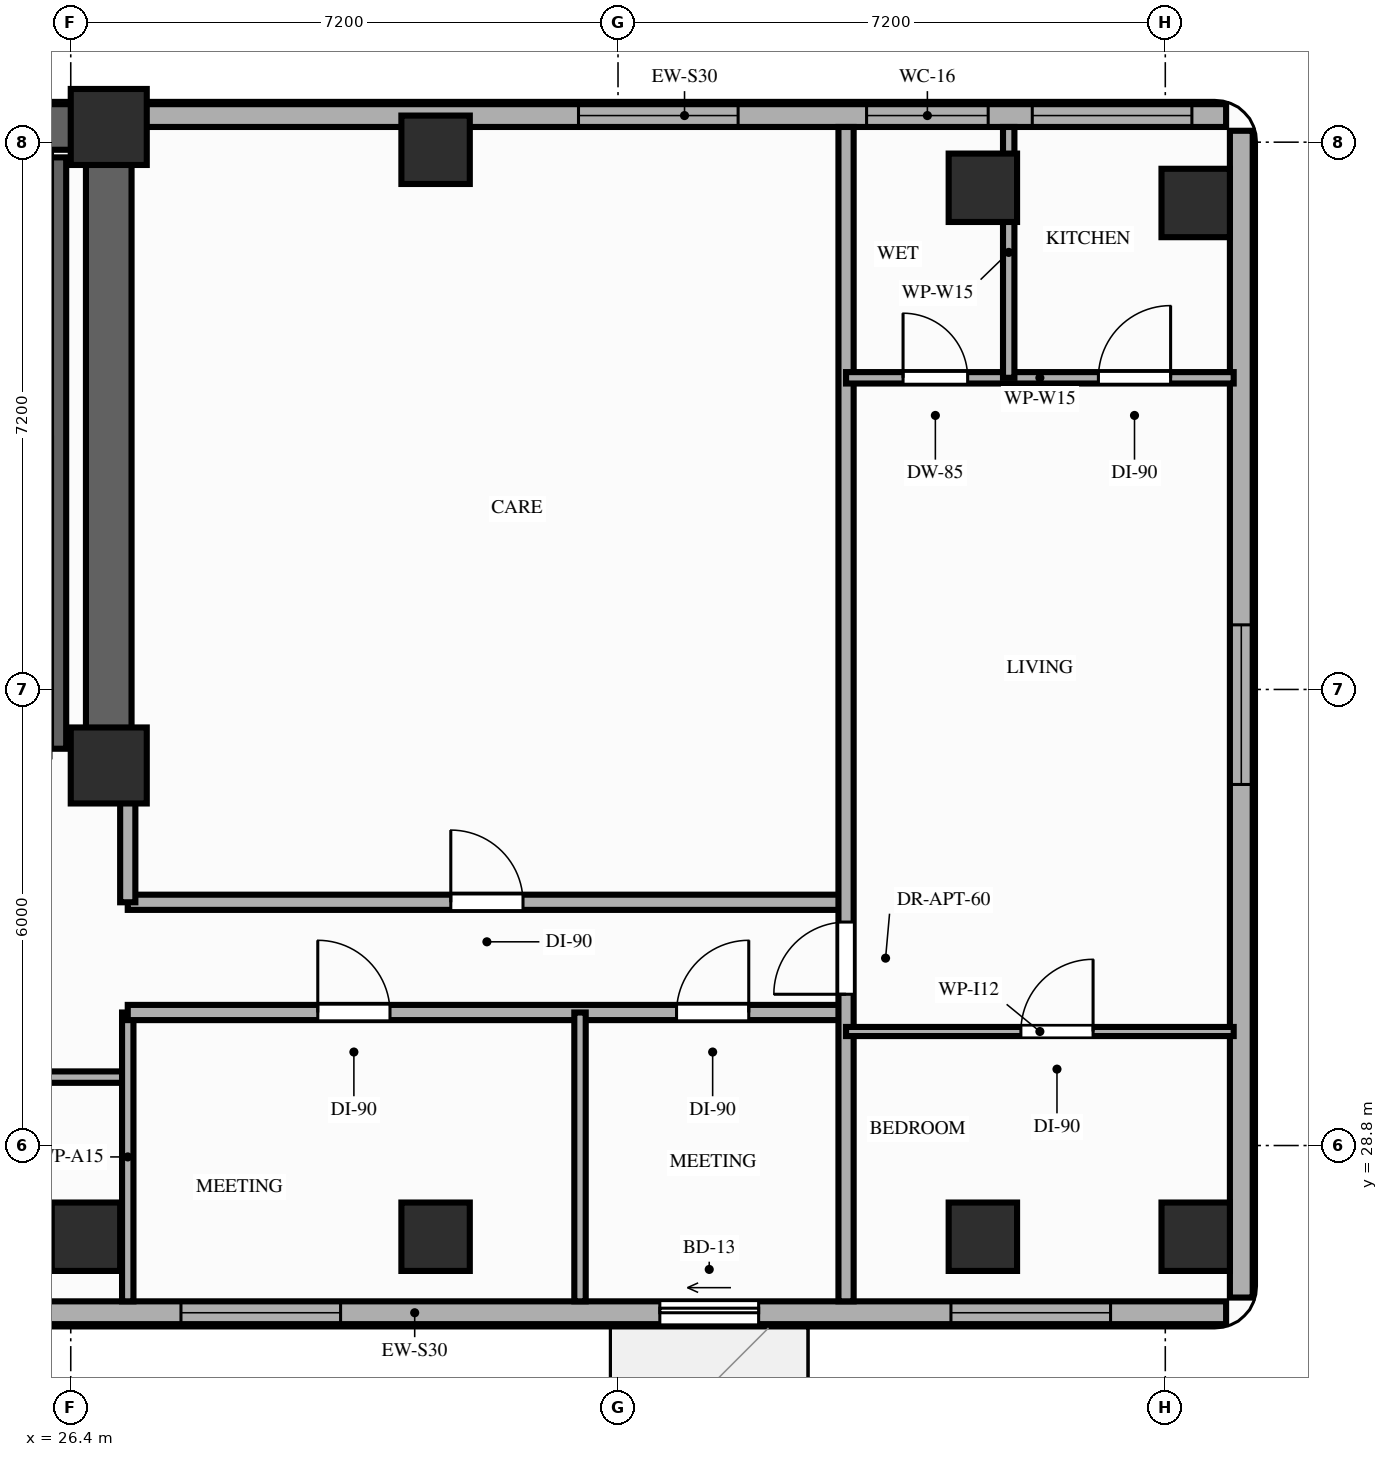
"""IFC4 building model, lengths in metres.
Left out: names, types, materials, properties, quantities, classifications, styles, units other than length and angle.
Written with IfcOpenShell. Run it as: python <this file> out.ifc"""

import sys

from ifc_helpers import new_model, si_unit, direction, frame, frame_2d, origin, origin_2d, place, context, subcontext, project, spatial, rectangle, extrude, element, fill, save


model = new_model("IFC4")
c1 = context("Model", 3, precision=1e-05, world=origin(), true_north=direction((0.0, 1.0)))
c2 = subcontext(c1, "Body", "Model", "MODEL_VIEW")
j1 = project(units=[si_unit("LENGTHUNIT", "METRE"), si_unit("PLANEANGLEUNIT", "RADIAN")], contexts=[c1])
p1 = place(None, origin())
s1 = spatial("IfcSite", under=j1, at=p1, CompositionType="ELEMENT")
p2 = place(p1, origin())
s2 = spatial("IfcBuilding", under=s1, at=p2, CompositionType="ELEMENT")
p3 = place(p2, frame((0.0, 0.0, 169.6)))
s3 = spatial("IfcBuildingStorey", under=s2, at=p3, CompositionType="ELEMENT", Elevation=169.6)
for number, where, z_axis, x_axis in (
    (1, (26.9, 33.8, 0.0), (0.0, 0.0, 1.0), (1.0, 0.0, 0.0)),
    (2, (26.9, 42.2, 0.0), (0.0, 0.0, 1.0), (1.0, 0.0, 0.0)),
):
    element("IfcColumn", number, at=place(p3, frame(where, z_axis=z_axis, x_axis=x_axis)), inside=s3, PredefinedType="COLUMN", context=c2, shape_type="SweptSolid", body=[
        extrude(rectangle(XDim=1.0, YDim=1.0, at=origin_2d()), origin(), (0.0, 0.0, 1.0), 3.2),
    ])
for number, where, z_axis, x_axis in (
    (3, (26.6, 27.6, 0.0), (0.0, 0.0, 1.0), (1.0, 0.0, 0.0)),
    (4, (31.2, 27.6, 0.0), (0.0, 0.0, 1.0), (1.0, 0.0, 0.0)),
    (5, (31.2, 41.9, 0.0), (0.0, 0.0, 1.0), (1.0, 0.0, 0.0)),
    (6, (38.4, 27.6, 0.0), (0.0, 0.0, 1.0), (1.0, 0.0, 0.0)),
    (7, (38.4, 41.4, 0.0), (0.0, 0.0, 1.0), (1.0, 0.0, 0.0)),
    (8, (41.2, 27.6, 0.0), (0.0, 0.0, 1.0), (1.0, 0.0, 0.0)),
    (9, (41.2, 41.2, 0.0), (0.0, 0.0, 1.0), (1.0, 0.0, 0.0)),
):
    element("IfcColumn", number, at=place(p3, frame(where, z_axis=z_axis, x_axis=x_axis)), inside=s3, PredefinedType="COLUMN", context=c2, shape_type="SweptSolid", body=[
        extrude(rectangle(XDim=0.9, YDim=0.9, at=origin_2d()), origin(), (0.0, 0.0, 1.0), 3.2),
    ])
p4 = place(p3, frame((41.6, 42.35, 0.0), z_axis=(0.0, 0.0, 1.0), x_axis=(-1.0, 0.0, 0.0)))
e10 = element("IfcWall", 10, at=p4, inside=s3, PredefinedType="STANDARD", context=c2, shape_type="SweptSolid", body=[
    extrude(rectangle(XDim=14.25, YDim=0.3, at=frame_2d((7.125, 0.0))), origin(), (0.0, 0.0, 1.0), 2.45),
])
p5 = place(p4, frame((3.13, 0.0, 0.85)))
e11 = element("IfcOpeningElement", 11, at=p5, cuts=e10, PredefinedType="OPENING", context=c2, shape_type="SweptSolid", body=[
    extrude(rectangle(XDim=1.6, YDim=1.35, at=frame_2d((0.8, 0.675))), frame((0.0, 0.16, 0.0), z_axis=(0.0, -1.0, 0.0), x_axis=(1.0, 0.0, 0.0)), (0.0, 0.0, 1.0), 0.32),
])
p6 = place(p4, frame((0.45, 0.0, 0.85)))
e12 = element("IfcOpeningElement", 12, at=p6, cuts=e10, PredefinedType="OPENING", context=c2, shape_type="SweptSolid", body=[
    extrude(rectangle(XDim=2.1, YDim=1.35, at=frame_2d((1.05, 0.675))), frame((0.0, 0.16, 0.0), z_axis=(0.0, -1.0, 0.0), x_axis=(1.0, 0.0, 0.0)), (0.0, 0.0, 1.0), 0.32),
])
p7 = place(p4, frame((6.42, 0.0, 0.85)))
e13 = element("IfcOpeningElement", 13, at=p7, cuts=e10, PredefinedType="OPENING", context=c2, shape_type="SweptSolid", body=[
    extrude(rectangle(XDim=2.1, YDim=1.35, at=frame_2d((1.05, 0.675))), frame((0.0, 0.16, 0.0), z_axis=(0.0, -1.0, 0.0), x_axis=(1.0, 0.0, 0.0)), (0.0, 0.0, 1.0), 0.32),
])
p8 = place(p3, frame((20.25, 26.6, 0.0), z_axis=(0.0, 0.0, 1.0), x_axis=(1.0, 0.0, 0.0)))
e14 = element("IfcWall", 14, at=p8, inside=s3, PredefinedType="STANDARD", context=c2, shape_type="SweptSolid", body=[
    extrude(rectangle(XDim=21.35, YDim=0.3, at=frame_2d((10.675, 0.0))), origin(), (0.0, 0.0, 1.0), 2.71),
])
p9 = place(p8, frame((13.9, 0.0, 0.0)))
e15 = element("IfcOpeningElement", 15, at=p9, cuts=e14, PredefinedType="OPENING", context=c2, shape_type="SweptSolid", body=[
    extrude(rectangle(XDim=1.3, YDim=2.08, at=frame_2d((0.65, 1.04))), frame((0.0, 0.16, 0.0), z_axis=(0.0, -1.0, 0.0), x_axis=(1.0, 0.0, 0.0)), (0.0, 0.0, 1.0), 0.32),
])
p10 = place(p8, frame((17.73, 0.0, 0.85)))
e16 = element("IfcOpeningElement", 16, at=p10, cuts=e14, PredefinedType="OPENING", context=c2, shape_type="SweptSolid", body=[
    extrude(rectangle(XDim=2.1, YDim=1.61, at=frame_2d((1.05, 0.805))), frame((0.0, 0.16, 0.0), z_axis=(0.0, -1.0, 0.0), x_axis=(1.0, 0.0, 0.0)), (0.0, 0.0, 1.0), 0.32),
])
p11 = place(p8, frame((2.1, 0.0, 0.85)))
e17 = element("IfcOpeningElement", 17, at=p11, cuts=e14, PredefinedType="OPENING", context=c2, shape_type="SweptSolid", body=[
    extrude(rectangle(XDim=2.1, YDim=1.61, at=frame_2d((1.05, 0.805))), frame((0.0, 0.16, 0.0), z_axis=(0.0, -1.0, 0.0), x_axis=(1.0, 0.0, 0.0)), (0.0, 0.0, 1.0), 0.32),
])
p12 = place(p8, frame((7.6, 0.0, 0.85)))
e18 = element("IfcOpeningElement", 18, at=p12, cuts=e14, PredefinedType="OPENING", context=c2, shape_type="SweptSolid", body=[
    extrude(rectangle(XDim=2.1, YDim=1.61, at=frame_2d((1.05, 0.805))), frame((0.0, 0.16, 0.0), z_axis=(0.0, -1.0, 0.0), x_axis=(1.0, 0.0, 0.0)), (0.0, 0.0, 1.0), 0.32),
])
p13 = place(p3, frame((41.8, 26.8, 0.0), z_axis=(0.0, 0.0, 1.0), x_axis=(0.0, 1.0, 0.0)))
e19 = element("IfcWall", 19, at=p13, inside=s3, PredefinedType="STANDARD", context=c2, shape_type="SweptSolid", body=[
    extrude(rectangle(XDim=15.35, YDim=0.3, at=frame_2d((7.675, 0.0))), origin(), (0.0, 0.0, 1.0), 3.02),
])
p14 = place(p13, frame((6.75, 0.0, 0.85)))
e20 = element("IfcOpeningElement", 20, at=p14, cuts=e19, PredefinedType="OPENING", context=c2, shape_type="SweptSolid", body=[
    extrude(rectangle(XDim=2.1, YDim=1.8, at=frame_2d((1.05, 0.9))), frame((0.0, 0.16, 0.0), z_axis=(0.0, -1.0, 0.0), x_axis=(1.0, 0.0, 0.0)), (0.0, 0.0, 1.0), 0.32),
])
p15 = place(p3, frame((6.45, 42.2, 0.0), z_axis=(0.0, 0.0, 1.0), x_axis=(1.0, 0.0, 0.0)))
e21 = element("IfcWall", 21, at=p15, inside=s3, PredefinedType="SHEAR", context=c2, shape_type="SweptSolid", body=[
    extrude(rectangle(XDim=20.45, YDim=0.6, at=frame_2d((10.225, 0.0))), origin(), (0.0, 0.0, 1.0), 3.02),
])
p16 = place(p3, frame((26.9, 33.8, 0.0), z_axis=(0.0, 0.0, 1.0), x_axis=(0.0, 1.0, 0.0)))
e22 = element("IfcWall", 22, at=p16, inside=s3, PredefinedType="SHEAR", context=c2, shape_type="SweptSolid", body=[
    extrude(rectangle(XDim=7.95, YDim=0.6, at=frame_2d((3.975, 0.0))), origin(), (0.0, 0.0, 1.0), 3.02),
])
p17 = place(p3, frame((26.24, 34.02, 0.0), z_axis=(0.0, 0.0, 1.0), x_axis=(0.0, 1.0, 0.0)))
e23 = element("IfcWall", 23, at=p17, inside=s3, PredefinedType="SHEAR", context=c2, shape_type="SweptSolid", body=[
    extrude(rectangle(XDim=7.78, YDim=0.2, at=frame_2d((3.89, 0.0))), origin(), (0.0, 0.0, 1.0), 3.02),
])
p18 = place(p3, frame((20.45, 29.7, 0.0), z_axis=(0.0, 0.0, 1.0), x_axis=(1.0, 0.0, 0.0)))
e24 = element("IfcWall", 24, at=p18, inside=s3, PredefinedType="PARTITIONING", context=c2, shape_type="SweptSolid", body=[
    extrude(rectangle(XDim=6.7, YDim=0.15, at=frame_2d((3.35, 0.0))), origin(), (0.0, 0.0, 1.0), 3.02),
])
p19 = place(p18, frame((2.8, 0.0, 0.0)))
e25 = element("IfcOpeningElement", 25, at=p19, cuts=e24, PredefinedType="OPENING", context=c2, shape_type="SweptSolid", body=[
    extrude(rectangle(XDim=0.95, YDim=2.15, at=frame_2d((0.475, 1.075))), frame((0.0, 0.085, 0.0), z_axis=(0.0, -1.0, 0.0), x_axis=(1.0, 0.0, 0.0)), (0.0, 0.0, 1.0), 0.17),
])
p20 = place(p3, frame((27.15, 26.75, 0.0), z_axis=(0.0, 0.0, 1.0), x_axis=(0.0, 1.0, 0.0)))
e26 = element("IfcWall", 26, at=p20, inside=s3, PredefinedType="PARTITIONING", context=c2, shape_type="SweptSolid", body=[
    extrude(rectangle(XDim=3.8, YDim=0.15, at=frame_2d((1.9, 0.0))), origin(), (0.0, 0.0, 1.0), 2.45),
])
p21 = place(p3, frame((27.15, 30.55, 0.0), z_axis=(0.0, 0.0, 1.0), x_axis=(1.0, 0.0, 0.0)))
e27 = element("IfcWall", 27, at=p21, inside=s3, PredefinedType="PARTITIONING", context=c2, shape_type="SweptSolid", body=[
    extrude(rectangle(XDim=9.45, YDim=0.2, at=frame_2d((4.725, 0.0))), origin(), (0.0, 0.0, 1.0), 2.45),
])
p22 = place(p21, frame((2.5, 0.0, 0.0)))
e28 = element("IfcOpeningElement", 28, at=p22, cuts=e27, PredefinedType="OPENING", context=c2, shape_type="SweptSolid", body=[
    extrude(rectangle(XDim=0.95, YDim=2.15, at=frame_2d((0.475, 1.075))), frame((0.0, 0.11, 0.0), z_axis=(0.0, -1.0, 0.0), x_axis=(1.0, 0.0, 0.0)), (0.0, 0.0, 1.0), 0.22),
])
p23 = place(p21, frame((7.22, 0.0, 0.0)))
e29 = element("IfcOpeningElement", 29, at=p23, cuts=e27, PredefinedType="OPENING", context=c2, shape_type="SweptSolid", body=[
    extrude(rectangle(XDim=0.95, YDim=2.15, at=frame_2d((0.475, 1.075))), frame((0.0, 0.11, 0.0), z_axis=(0.0, -1.0, 0.0), x_axis=(1.0, 0.0, 0.0)), (0.0, 0.0, 1.0), 0.22),
])
p24 = place(p3, frame((27.15, 32.0, 0.0), z_axis=(0.0, 0.0, 1.0), x_axis=(1.0, 0.0, 0.0)))
e30 = element("IfcWall", 30, at=p24, inside=s3, PredefinedType="PARTITIONING", context=c2, shape_type="SweptSolid", body=[
    extrude(rectangle(XDim=9.45, YDim=0.2, at=frame_2d((4.725, 0.0))), origin(), (0.0, 0.0, 1.0), 2.45),
])
p25 = place(p24, frame((4.25, 0.0, 0.0)))
e31 = element("IfcOpeningElement", 31, at=p25, cuts=e30, PredefinedType="OPENING", context=c2, shape_type="SweptSolid", body=[
    extrude(rectangle(XDim=0.95, YDim=2.15, at=frame_2d((0.475, 1.075))), frame((0.0, 0.11, 0.0), z_axis=(0.0, -1.0, 0.0), x_axis=(1.0, 0.0, 0.0)), (0.0, 0.0, 1.0), 0.22),
])
p26 = place(p3, frame((27.15, 32.0, 0.0), z_axis=(0.0, 0.0, 1.0), x_axis=(0.0, 1.0, 0.0)))
e32 = element("IfcWall", 32, at=p26, inside=s3, PredefinedType="PARTITIONING", context=c2, shape_type="SweptSolid", body=[
    extrude(rectangle(XDim=1.68, YDim=0.2, at=frame_2d((0.84, 0.0))), origin(), (0.0, 0.0, 1.0), 2.45),
])
p27 = place(p3, frame((36.6, 26.75, 0.0), z_axis=(0.0, 0.0, 1.0), x_axis=(0.0, 1.0, 0.0)))
e33 = element("IfcWall", 33, at=p27, inside=s3, PredefinedType="PARTITIONING", context=c2, shape_type="SweptSolid", body=[
    extrude(rectangle(XDim=15.45, YDim=0.2, at=frame_2d((7.725, 0.0))), origin(), (0.0, 0.0, 1.0), 2.45),
])
p28 = place(p27, frame((4.04, 0.0, 0.0)))
e34 = element("IfcOpeningElement", 34, at=p28, cuts=e33, PredefinedType="OPENING", context=c2, shape_type="SweptSolid", body=[
    extrude(rectangle(XDim=0.95, YDim=2.15, at=frame_2d((0.475, 1.075))), frame((0.0, 0.11, 0.0), z_axis=(0.0, -1.0, 0.0), x_axis=(1.0, 0.0, 0.0)), (0.0, 0.0, 1.0), 0.22),
])
p29 = place(p3, frame((36.6, 30.3, 0.0), z_axis=(0.0, 0.0, 1.0), x_axis=(1.0, 0.0, 0.0)))
e35 = element("IfcWall", 35, at=p29, inside=s3, PredefinedType="PARTITIONING", context=c2, shape_type="SweptSolid", body=[
    extrude(rectangle(XDim=5.1, YDim=0.12, at=frame_2d((2.55, 0.0))), origin(), (0.0, 0.0, 1.0), 2.45),
])
p30 = place(p29, frame((2.3, 0.0, 0.0)))
e36 = element("IfcOpeningElement", 36, at=p30, cuts=e35, PredefinedType="OPENING", context=c2, shape_type="SweptSolid", body=[
    extrude(rectangle(XDim=0.95, YDim=2.15, at=frame_2d((0.475, 1.075))), frame((0.0, 0.07, 0.0), z_axis=(0.0, -1.0, 0.0), x_axis=(1.0, 0.0, 0.0)), (0.0, 0.0, 1.0), 0.14),
])
p31 = place(p3, frame((36.6, 38.9, 0.0), z_axis=(0.0, 0.0, 1.0), x_axis=(1.0, 0.0, 0.0)))
e37 = element("IfcWall", 37, at=p31, inside=s3, PredefinedType="PARTITIONING", context=c2, shape_type="SweptSolid", body=[
    extrude(rectangle(XDim=5.1, YDim=0.15, at=frame_2d((2.55, 0.0))), origin(), (0.0, 0.0, 1.0), 2.45),
])
p32 = place(p31, frame((0.75, 0.0, 0.0)))
e38 = element("IfcOpeningElement", 38, at=p32, cuts=e37, PredefinedType="OPENING", context=c2, shape_type="SweptSolid", body=[
    extrude(rectangle(XDim=0.85, YDim=2.1, at=frame_2d((0.425, 1.05))), frame((0.0, 0.085, 0.0), z_axis=(0.0, -1.0, 0.0), x_axis=(1.0, 0.0, 0.0)), (0.0, 0.0, 1.0), 0.17),
])
p33 = place(p31, frame((3.32, 0.0, 0.0)))
e39 = element("IfcOpeningElement", 39, at=p33, cuts=e37, PredefinedType="OPENING", context=c2, shape_type="SweptSolid", body=[
    extrude(rectangle(XDim=0.95, YDim=2.15, at=frame_2d((0.475, 1.075))), frame((0.0, 0.085, 0.0), z_axis=(0.0, -1.0, 0.0), x_axis=(1.0, 0.0, 0.0)), (0.0, 0.0, 1.0), 0.17),
])
p34 = place(p3, frame((38.74, 38.9, 0.0), z_axis=(0.0, 0.0, 1.0), x_axis=(0.0, 1.0, 0.0)))
e40 = element("IfcWall", 40, at=p34, inside=s3, PredefinedType="PARTITIONING", context=c2, shape_type="SweptSolid", body=[
    extrude(rectangle(XDim=3.3, YDim=0.15, at=frame_2d((1.65, 0.0))), origin(), (0.0, 0.0, 1.0), 2.45),
])
p35 = place(p3, frame((33.1, 26.75, 0.0), z_axis=(0.0, 0.0, 1.0), x_axis=(0.0, 1.0, 0.0)))
e41 = element("IfcWall", 41, at=p35, inside=s3, PredefinedType="PARTITIONING", context=c2, shape_type="SweptSolid", body=[
    extrude(rectangle(XDim=3.8, YDim=0.15, at=frame_2d((1.9, 0.0))), origin(), (0.0, 0.0, 1.0), 2.45),
])
p36 = place(p9, origin())
e42 = element("IfcDoor", 42, at=p36, inside=s3, OperationType="SLIDING_TO_LEFT", PredefinedType="DOOR", context=c2, shape_type="SweptSolid", body=[
    extrude(rectangle(XDim=1.3, YDim=2.08, at=frame_2d((0.65, 1.04))), frame((0.0, 0.025, 0.0), z_axis=(0.0, -1.0, 0.0), x_axis=(1.0, 0.0, 0.0)), (0.0, 0.0, 1.0), 0.05),
])
fill(e15, e42)
p37 = place(p14, origin())
e43 = element("IfcWindow", 43, at=p37, inside=s3, PartitioningType="SINGLE_PANEL", PredefinedType="WINDOW", context=c2, shape_type="SweptSolid", body=[
    extrude(rectangle(XDim=2.1, YDim=1.8, at=frame_2d((1.05, 0.9))), frame((0.0, 0.03, 0.0), z_axis=(0.0, -1.0, 0.0), x_axis=(1.0, 0.0, 0.0)), (0.0, 0.0, 1.0), 0.06),
])
fill(e20, e43)
p38 = place(p10, origin())
e44 = element("IfcWindow", 44, at=p38, inside=s3, PartitioningType="SINGLE_PANEL", PredefinedType="WINDOW", context=c2, shape_type="SweptSolid", body=[
    extrude(rectangle(XDim=2.1, YDim=1.61, at=frame_2d((1.05, 0.805))), frame((0.0, 0.03, 0.0), z_axis=(0.0, -1.0, 0.0), x_axis=(1.0, 0.0, 0.0)), (0.0, 0.0, 1.0), 0.06),
])
fill(e16, e44)
p39 = place(p5, origin())
e45 = element("IfcWindow", 45, at=p39, inside=s3, PartitioningType="SINGLE_PANEL", PredefinedType="WINDOW", context=c2, shape_type="SweptSolid", body=[
    extrude(rectangle(XDim=1.6, YDim=1.35, at=frame_2d((0.8, 0.675))), frame((0.0, 0.03, 0.0), z_axis=(0.0, -1.0, 0.0), x_axis=(1.0, 0.0, 0.0)), (0.0, 0.0, 1.0), 0.06),
])
fill(e11, e45)
p40 = place(p6, origin())
e46 = element("IfcWindow", 46, at=p40, inside=s3, PartitioningType="SINGLE_PANEL", PredefinedType="WINDOW", context=c2, shape_type="SweptSolid", body=[
    extrude(rectangle(XDim=2.1, YDim=1.35, at=frame_2d((1.05, 0.675))), frame((0.0, 0.03, 0.0), z_axis=(0.0, -1.0, 0.0), x_axis=(1.0, 0.0, 0.0)), (0.0, 0.0, 1.0), 0.06),
])
fill(e12, e46)
p41 = place(p7, origin())
e47 = element("IfcWindow", 47, at=p41, inside=s3, PartitioningType="SINGLE_PANEL", PredefinedType="WINDOW", context=c2, shape_type="SweptSolid", body=[
    extrude(rectangle(XDim=2.1, YDim=1.35, at=frame_2d((1.05, 0.675))), frame((0.0, 0.03, 0.0), z_axis=(0.0, -1.0, 0.0), x_axis=(1.0, 0.0, 0.0)), (0.0, 0.0, 1.0), 0.06),
])
fill(e13, e47)
p42 = place(p12, origin())
e48 = element("IfcWindow", 48, at=p42, inside=s3, PartitioningType="SINGLE_PANEL", PredefinedType="WINDOW", context=c2, shape_type="SweptSolid", body=[
    extrude(rectangle(XDim=2.1, YDim=1.61, at=frame_2d((1.05, 0.805))), frame((0.0, 0.03, 0.0), z_axis=(0.0, -1.0, 0.0), x_axis=(1.0, 0.0, 0.0)), (0.0, 0.0, 1.0), 0.06),
])
fill(e18, e48)
p43 = place(p28, origin())
e49 = element("IfcDoor", 49, at=p43, inside=s3, OperationType="SINGLE_SWING_LEFT", PredefinedType="DOOR", context=c2, shape_type="SweptSolid", body=[
    extrude(rectangle(XDim=0.95, YDim=2.15, at=frame_2d((0.475, 1.075))), frame((0.0, 0.025, 0.0), z_axis=(0.0, -1.0, 0.0), x_axis=(1.0, 0.0, 0.0)), (0.0, 0.0, 1.0), 0.05),
])
fill(e34, e49)
p44 = place(p30, origin())
e50 = element("IfcDoor", 50, at=p44, inside=s3, OperationType="SINGLE_SWING_RIGHT", PredefinedType="DOOR", context=c2, shape_type="SweptSolid", body=[
    extrude(rectangle(XDim=0.95, YDim=2.15, at=frame_2d((0.475, 1.075))), frame((0.0, 0.025, 0.0), z_axis=(0.0, -1.0, 0.0), x_axis=(1.0, 0.0, 0.0)), (0.0, 0.0, 1.0), 0.05),
])
fill(e36, e50)
p45 = place(p32, origin())
e51 = element("IfcDoor", 51, at=p45, inside=s3, OperationType="SINGLE_SWING_LEFT", PredefinedType="DOOR", context=c2, shape_type="SweptSolid", body=[
    extrude(rectangle(XDim=0.85, YDim=2.1, at=frame_2d((0.425, 1.05))), frame((0.0, 0.025, 0.0), z_axis=(0.0, -1.0, 0.0), x_axis=(1.0, 0.0, 0.0)), (0.0, 0.0, 1.0), 0.05),
])
fill(e38, e51)
p46 = place(p33, origin())
e52 = element("IfcDoor", 52, at=p46, inside=s3, OperationType="SINGLE_SWING_RIGHT", PredefinedType="DOOR", context=c2, shape_type="SweptSolid", body=[
    extrude(rectangle(XDim=0.95, YDim=2.15, at=frame_2d((0.475, 1.075))), frame((0.0, 0.025, 0.0), z_axis=(0.0, -1.0, 0.0), x_axis=(1.0, 0.0, 0.0)), (0.0, 0.0, 1.0), 0.05),
])
fill(e39, e52)
p47 = place(p22, origin())
e53 = element("IfcDoor", 53, at=p47, inside=s3, OperationType="SINGLE_SWING_LEFT", PredefinedType="DOOR", context=c2, shape_type="SweptSolid", body=[
    extrude(rectangle(XDim=0.95, YDim=2.15, at=frame_2d((0.475, 1.075))), frame((0.0, 0.025, 0.0), z_axis=(0.0, -1.0, 0.0), x_axis=(1.0, 0.0, 0.0)), (0.0, 0.0, 1.0), 0.05),
])
fill(e28, e53)
p48 = place(p23, origin())
e54 = element("IfcDoor", 54, at=p48, inside=s3, OperationType="SINGLE_SWING_RIGHT", PredefinedType="DOOR", context=c2, shape_type="SweptSolid", body=[
    extrude(rectangle(XDim=0.95, YDim=2.15, at=frame_2d((0.475, 1.075))), frame((0.0, 0.025, 0.0), z_axis=(0.0, -1.0, 0.0), x_axis=(1.0, 0.0, 0.0)), (0.0, 0.0, 1.0), 0.05),
])
fill(e29, e54)
p49 = place(p25, origin())
e55 = element("IfcDoor", 55, at=p49, inside=s3, OperationType="SINGLE_SWING_LEFT", PredefinedType="DOOR", context=c2, shape_type="SweptSolid", body=[
    extrude(rectangle(XDim=0.95, YDim=2.15, at=frame_2d((0.475, 1.075))), frame((0.0, 0.025, 0.0), z_axis=(0.0, -1.0, 0.0), x_axis=(1.0, 0.0, 0.0)), (0.0, 0.0, 1.0), 0.05),
])
fill(e31, e55)
save(model, sys.argv[1])
